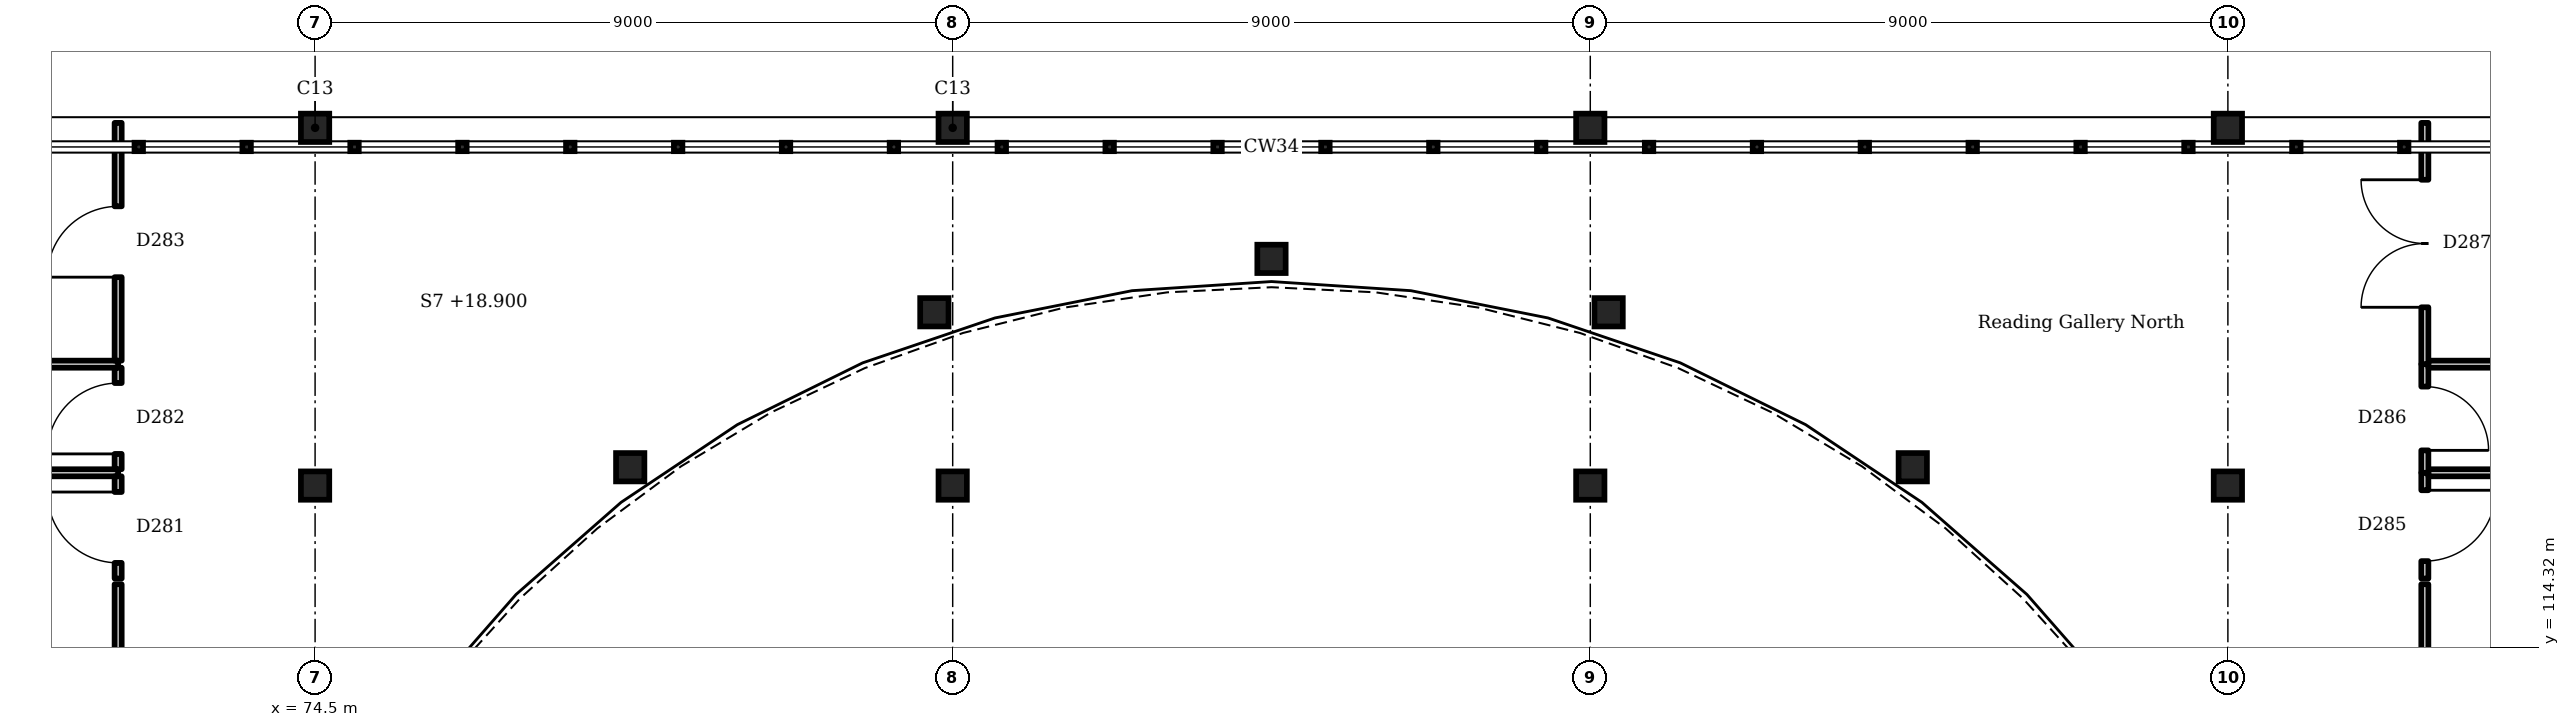
"""IFC4 building model, lengths in metres.
Left out: names, types, materials, properties, quantities, classifications, styles, units other than length and angle.
Written with IfcOpenShell. Run it as: python <this file> out.ifc"""

import sys

from ifc_helpers import new_model, si_unit, direction, frame, frame_2d, origin, origin_2d, place, context, subcontext, project, spatial, rectangle, hollow_circle, extrude, element, fill, save


model = new_model("IFC4")
c1 = context("Model", 3, precision=1e-05, world=origin(), true_north=direction((0.0, 1.0)))
c2 = subcontext(c1, "Body", "Model", "MODEL_VIEW")
j1 = project(units=[si_unit("LENGTHUNIT", "METRE"), si_unit("PLANEANGLEUNIT", "RADIAN")], contexts=[c1])
p1 = place(None, origin())
s1 = spatial("IfcSite", under=j1, at=p1, CompositionType="ELEMENT")
p2 = place(p1, origin())
s2 = spatial("IfcBuilding", under=s1, at=p2, CompositionType="ELEMENT")
p3 = place(p2, frame((0.0, 0.0, 18.9)))
s3 = spatial("IfcBuildingStorey", under=s2, at=p3, CompositionType="ELEMENT", Elevation=18.9)
for number, where, z_axis, x_axis in (
    (1, (97.052, 116.859, 0.0), (0.0, 0.0, 1.0), (1.0, 0.0, 0.0)),
    (2, (92.759, 119.046, 0.0), (0.0, 0.0, 1.0), (1.0, 0.0, 0.0)),
    (3, (88.0, 119.8, 0.0), (0.0, 0.0, 1.0), (1.0, 0.0, 0.0)),
    (4, (83.241, 119.046, 0.0), (0.0, 0.0, 1.0), (1.0, 0.0, 0.0)),
    (5, (78.948, 116.859, 0.0), (0.0, 0.0, 1.0), (1.0, 0.0, 0.0)),
):
    element("IfcColumn", number, at=place(p3, frame(where, z_axis=z_axis, x_axis=x_axis)), inside=s3, PredefinedType="COLUMN", context=c2, shape_type="SweptSolid", body=[
        extrude(hollow_circle(Radius=0.203, WallThickness=0.012, at=origin_2d()), origin(), (0.0, 0.0, 1.0), 4.5),
    ])
for number, where, z_axis, x_axis in (
    (6, (74.5, 121.65, 0.0), (0.0, 0.0, 1.0), (1.0, 0.0, 0.0)),
    (7, (83.5, 121.65, 0.0), (0.0, 0.0, 1.0), (1.0, 0.0, 0.0)),
    (8, (92.5, 121.65, 0.0), (0.0, 0.0, 1.0), (1.0, 0.0, 0.0)),
    (9, (101.5, 121.65, 0.0), (0.0, 0.0, 1.0), (1.0, 0.0, 0.0)),
    (10, (74.5, 116.6, 0.0), (0.0, 0.0, 1.0), (1.0, 0.0, 0.0)),
    (11, (83.5, 116.6, 0.0), (0.0, 0.0, 1.0), (1.0, 0.0, 0.0)),
    (12, (92.5, 116.6, 0.0), (0.0, 0.0, 1.0), (1.0, 0.0, 0.0)),
    (13, (101.5, 116.6, 0.0), (0.0, 0.0, 1.0), (1.0, 0.0, 0.0)),
):
    element("IfcColumn", number, at=place(p3, frame(where, z_axis=z_axis, x_axis=x_axis)), inside=s3, PredefinedType="COLUMN", context=c2, shape_type="SweptSolid", body=[
        extrude(hollow_circle(Radius=0.162, WallThickness=0.012, at=origin_2d()), origin(), (0.0, 0.0, 1.0), 4.5),
    ])
p4 = place(p3, frame((65.662, 116.781, 0.0), z_axis=(0.0, 0.0, 1.0), x_axis=(1.0, 0.0, 0.0)))
e14 = element("IfcWall", 14, at=p4, inside=s3, PredefinedType="PARTITIONING", context=c2, shape_type="SweptSolid", body=[
    extrude(rectangle(XDim=6.058, YDim=0.1, at=frame_2d((3.029, 0.0))), origin(), (0.0, 0.0, 1.0), 3.85),
])
p5 = place(p3, frame((71.72, 116.73, 0.0), z_axis=(0.0, 0.0, 1.0), x_axis=(0.0, -1.0, 0.0)))
e15 = element("IfcWall", 15, at=p5, inside=s3, PredefinedType="PARTITIONING", context=c2, shape_type="SweptSolid", body=[
    extrude(rectangle(XDim=1.443, YDim=0.1, at=frame_2d((0.722, 0.0))), origin(), (0.0, 0.0, 1.0), 4.35),
])
p6 = place(p5, frame((0.222, 0.0, 0.0)))
e16 = element("IfcOpeningElement", 16, at=p6, cuts=e15, PredefinedType="OPENING", context=c2, shape_type="SweptSolid", body=[
    extrude(rectangle(XDim=1.0, YDim=2.1, at=frame_2d((0.5, 1.05))), frame((0.0, 0.06, 0.0), z_axis=(0.0, -1.0, 0.0), x_axis=(1.0, 0.0, 0.0)), (0.0, 0.0, 1.0), 0.12),
])
p7 = place(p3, frame((71.72, 115.207, 0.0), z_axis=(0.0, 0.0, 1.0), x_axis=(0.0, -1.0, 0.0)))
e17 = element("IfcWall", 17, at=p7, inside=s3, PredefinedType="PARTITIONING", context=c2, shape_type="SweptSolid", body=[
    extrude(rectangle(XDim=4.352, YDim=0.1, at=frame_2d((2.176, 0.0))), origin(), (0.0, 0.0, 1.0), 4.35),
])
p8 = place(p3, frame((65.58, 118.314, 0.0), z_axis=(0.0, 0.0, 1.0), x_axis=(1.0, 0.0, 0.0)))
e18 = element("IfcWall", 18, at=p8, inside=s3, PredefinedType="PARTITIONING", context=c2, shape_type="SweptSolid", body=[
    extrude(rectangle(XDim=6.14, YDim=0.1, at=frame_2d((3.07, 0.0))), origin(), (0.0, 0.0, 1.0), 3.85),
])
p9 = place(p3, frame((71.72, 118.264, 0.0), z_axis=(0.0, 0.0, 1.0), x_axis=(0.0, -1.0, 0.0)))
e19 = element("IfcWall", 19, at=p9, inside=s3, PredefinedType="PARTITIONING", context=c2, shape_type="SweptSolid", body=[
    extrude(rectangle(XDim=1.433, YDim=0.1, at=frame_2d((0.717, 0.0))), origin(), (0.0, 0.0, 1.0), 4.35),
])
p10 = place(p9, frame((0.217, 0.0, 0.0)))
e20 = element("IfcOpeningElement", 20, at=p10, cuts=e19, PredefinedType="OPENING", context=c2, shape_type="SweptSolid", body=[
    extrude(rectangle(XDim=1.0, YDim=2.1, at=frame_2d((0.5, 1.05))), frame((0.0, 0.06, 0.0), z_axis=(0.0, -1.0, 0.0), x_axis=(1.0, 0.0, 0.0)), (0.0, 0.0, 1.0), 0.12),
])
p11 = place(p3, frame((71.72, 121.72, 0.0), z_axis=(0.0, 0.0, 1.0), x_axis=(0.0, -1.0, 0.0)))
e21 = element("IfcWall", 21, at=p11, inside=s3, PredefinedType="PARTITIONING", context=c2, shape_type="SweptSolid", body=[
    extrude(rectangle(XDim=3.356, YDim=0.1, at=frame_2d((1.678, 0.0))), origin(), (0.0, 0.0, 1.0), 3.95),
])
p12 = place(p11, frame((1.178, 0.0, 0.0)))
e22 = element("IfcOpeningElement", 22, at=p12, cuts=e21, PredefinedType="OPENING", context=c2, shape_type="SweptSolid", body=[
    extrude(rectangle(XDim=1.0, YDim=2.1, at=frame_2d((0.5, 1.05))), frame((0.0, 0.06, 0.0), z_axis=(0.0, -1.0, 0.0), x_axis=(1.0, 0.0, 0.0)), (0.0, 0.0, 1.0), 0.12),
])
p13 = place(p3, frame((104.28, 110.855, 0.0), z_axis=(0.0, 0.0, 1.0), x_axis=(0.0, 1.0, 0.0)))
e23 = element("IfcWall", 23, at=p13, inside=s3, PredefinedType="PARTITIONING", context=c2, shape_type="SweptSolid", body=[
    extrude(rectangle(XDim=4.352, YDim=0.1, at=frame_2d((2.176, 0.0))), origin(), (0.0, 0.0, 1.0), 4.35),
])
p14 = place(p3, frame((104.28, 115.287, 0.0), z_axis=(0.0, 0.0, 1.0), x_axis=(0.0, 1.0, 0.0)))
e24 = element("IfcWall", 24, at=p14, inside=s3, PredefinedType="PARTITIONING", context=c2, shape_type="SweptSolid", body=[
    extrude(rectangle(XDim=1.493, YDim=0.1, at=frame_2d((0.747, 0.0))), origin(), (0.0, 0.0, 1.0), 4.35),
])
p15 = place(p14, frame((0.247, 0.0, 0.0)))
e25 = element("IfcOpeningElement", 25, at=p15, cuts=e24, PredefinedType="OPENING", context=c2, shape_type="SweptSolid", body=[
    extrude(rectangle(XDim=1.0, YDim=2.1, at=frame_2d((0.5, 1.05))), frame((0.0, 0.06, 0.0), z_axis=(0.0, -1.0, 0.0), x_axis=(1.0, 0.0, 0.0)), (0.0, 0.0, 1.0), 0.12),
])
p16 = place(p3, frame((104.33, 116.781, 0.0), z_axis=(0.0, 0.0, 1.0), x_axis=(1.0, 0.0, 0.0)))
e26 = element("IfcWall", 26, at=p16, inside=s3, PredefinedType="PARTITIONING", context=c2, shape_type="SweptSolid", body=[
    extrude(rectangle(XDim=6.008, YDim=0.1, at=frame_2d((3.004, 0.0))), origin(), (0.0, 0.0, 1.0), 3.85),
])
p17 = place(p3, frame((104.28, 116.781, 0.0), z_axis=(0.0, 0.0, 1.0), x_axis=(0.0, 1.0, 0.0)))
e27 = element("IfcWall", 27, at=p17, inside=s3, PredefinedType="PARTITIONING", context=c2, shape_type="SweptSolid", body=[
    extrude(rectangle(XDim=1.533, YDim=0.1, at=frame_2d((0.767, 0.0))), origin(), (0.0, 0.0, 1.0), 4.35),
])
p18 = place(p17, frame((0.317, 0.0, 0.0)))
e28 = element("IfcOpeningElement", 28, at=p18, cuts=e27, PredefinedType="OPENING", context=c2, shape_type="SweptSolid", body=[
    extrude(rectangle(XDim=0.9, YDim=2.1, at=frame_2d((0.45, 1.05))), frame((0.0, 0.06, 0.0), z_axis=(0.0, -1.0, 0.0), x_axis=(1.0, 0.0, 0.0)), (0.0, 0.0, 1.0), 0.12),
])
p19 = place(p3, frame((104.33, 118.314, 0.0), z_axis=(0.0, 0.0, 1.0), x_axis=(1.0, 0.0, 0.0)))
e29 = element("IfcWall", 29, at=p19, inside=s3, PredefinedType="PARTITIONING", context=c2, shape_type="SweptSolid", body=[
    extrude(rectangle(XDim=6.09, YDim=0.1, at=frame_2d((3.045, 0.0))), origin(), (0.0, 0.0, 1.0), 3.85),
])
p20 = place(p3, frame((104.28, 118.314, 0.0), z_axis=(0.0, 0.0, 1.0), x_axis=(0.0, 1.0, 0.0)))
e30 = element("IfcWall", 30, at=p20, inside=s3, PredefinedType="PARTITIONING", context=c2, shape_type="SweptSolid", body=[
    extrude(rectangle(XDim=3.406, YDim=0.1, at=frame_2d((1.703, 0.0))), origin(), (0.0, 0.0, 1.0), 3.95),
])
p21 = place(p20, frame((0.803, 0.0, 0.0)))
e31 = element("IfcOpeningElement", 31, at=p21, cuts=e30, PredefinedType="OPENING", context=c2, shape_type="SweptSolid", body=[
    extrude(rectangle(XDim=1.8, YDim=2.1, at=frame_2d((0.9, 1.05))), frame((0.0, 0.06, 0.0), z_axis=(0.0, -1.0, 0.0), x_axis=(1.0, 0.0, 0.0)), (0.0, 0.0, 1.0), 0.12),
])
p22 = place(p6, frame((1.0, 0.0, 0.0), z_axis=(0.0, 0.0, 1.0), x_axis=(-1.0, 0.0, 0.0)))
e32 = element("IfcDoor", 32, at=p22, inside=s3, OperationType="SINGLE_SWING_LEFT", PredefinedType="DOOR", context=c2, shape_type="SweptSolid", body=[
    extrude(rectangle(XDim=1.0, YDim=2.1, at=frame_2d((0.5, 1.05))), frame((0.0, 0.025, 0.0), z_axis=(0.0, -1.0, 0.0), x_axis=(1.0, 0.0, 0.0)), (0.0, 0.0, 1.0), 0.05),
])
fill(e16, e32)
p23 = place(p10, frame((1.0, 0.0, 0.0), z_axis=(0.0, 0.0, 1.0), x_axis=(-1.0, 0.0, 0.0)))
e33 = element("IfcDoor", 33, at=p23, inside=s3, OperationType="SINGLE_SWING_RIGHT", PredefinedType="DOOR", context=c2, shape_type="SweptSolid", body=[
    extrude(rectangle(XDim=1.0, YDim=2.1, at=frame_2d((0.5, 1.05))), frame((0.0, 0.025, 0.0), z_axis=(0.0, -1.0, 0.0), x_axis=(1.0, 0.0, 0.0)), (0.0, 0.0, 1.0), 0.05),
])
fill(e20, e33)
p24 = place(p12, frame((1.0, 0.0, 0.0), z_axis=(0.0, 0.0, 1.0), x_axis=(-1.0, 0.0, 0.0)))
e34 = element("IfcDoor", 34, at=p24, inside=s3, OperationType="SINGLE_SWING_RIGHT", PredefinedType="DOOR", context=c2, shape_type="SweptSolid", body=[
    extrude(rectangle(XDim=1.0, YDim=2.1, at=frame_2d((0.5, 1.05))), frame((0.0, 0.025, 0.0), z_axis=(0.0, -1.0, 0.0), x_axis=(1.0, 0.0, 0.0)), (0.0, 0.0, 1.0), 0.05),
])
fill(e22, e34)
p25 = place(p15, frame((1.0, 0.0, 0.0), z_axis=(0.0, 0.0, 1.0), x_axis=(-1.0, 0.0, 0.0)))
e35 = element("IfcDoor", 35, at=p25, inside=s3, OperationType="SINGLE_SWING_RIGHT", PredefinedType="DOOR", context=c2, shape_type="SweptSolid", body=[
    extrude(rectangle(XDim=1.0, YDim=2.1, at=frame_2d((0.5, 1.05))), frame((0.0, 0.025, 0.0), z_axis=(0.0, -1.0, 0.0), x_axis=(1.0, 0.0, 0.0)), (0.0, 0.0, 1.0), 0.05),
])
fill(e25, e35)
p26 = place(p18, frame((0.9, 0.0, 0.0), z_axis=(0.0, 0.0, 1.0), x_axis=(-1.0, 0.0, 0.0)))
e36 = element("IfcDoor", 36, at=p26, inside=s3, OperationType="SINGLE_SWING_LEFT", PredefinedType="DOOR", context=c2, shape_type="SweptSolid", body=[
    extrude(rectangle(XDim=0.9, YDim=2.1, at=frame_2d((0.45, 1.05))), frame((0.0, 0.025, 0.0), z_axis=(0.0, -1.0, 0.0), x_axis=(1.0, 0.0, 0.0)), (0.0, 0.0, 1.0), 0.05),
])
fill(e28, e36)
p27 = place(p21, origin())
e37 = element("IfcDoor", 37, at=p27, inside=s3, OperationType="DOUBLE_DOOR_SINGLE_SWING", PredefinedType="DOOR", context=c2, shape_type="SweptSolid", body=[
    extrude(rectangle(XDim=1.8, YDim=2.1, at=frame_2d((0.9, 1.05))), frame((0.0, 0.025, 0.0), z_axis=(0.0, -1.0, 0.0), x_axis=(1.0, 0.0, 0.0)), (0.0, 0.0, 1.0), 0.05),
])
fill(e31, e37)
save(model, sys.argv[1])
